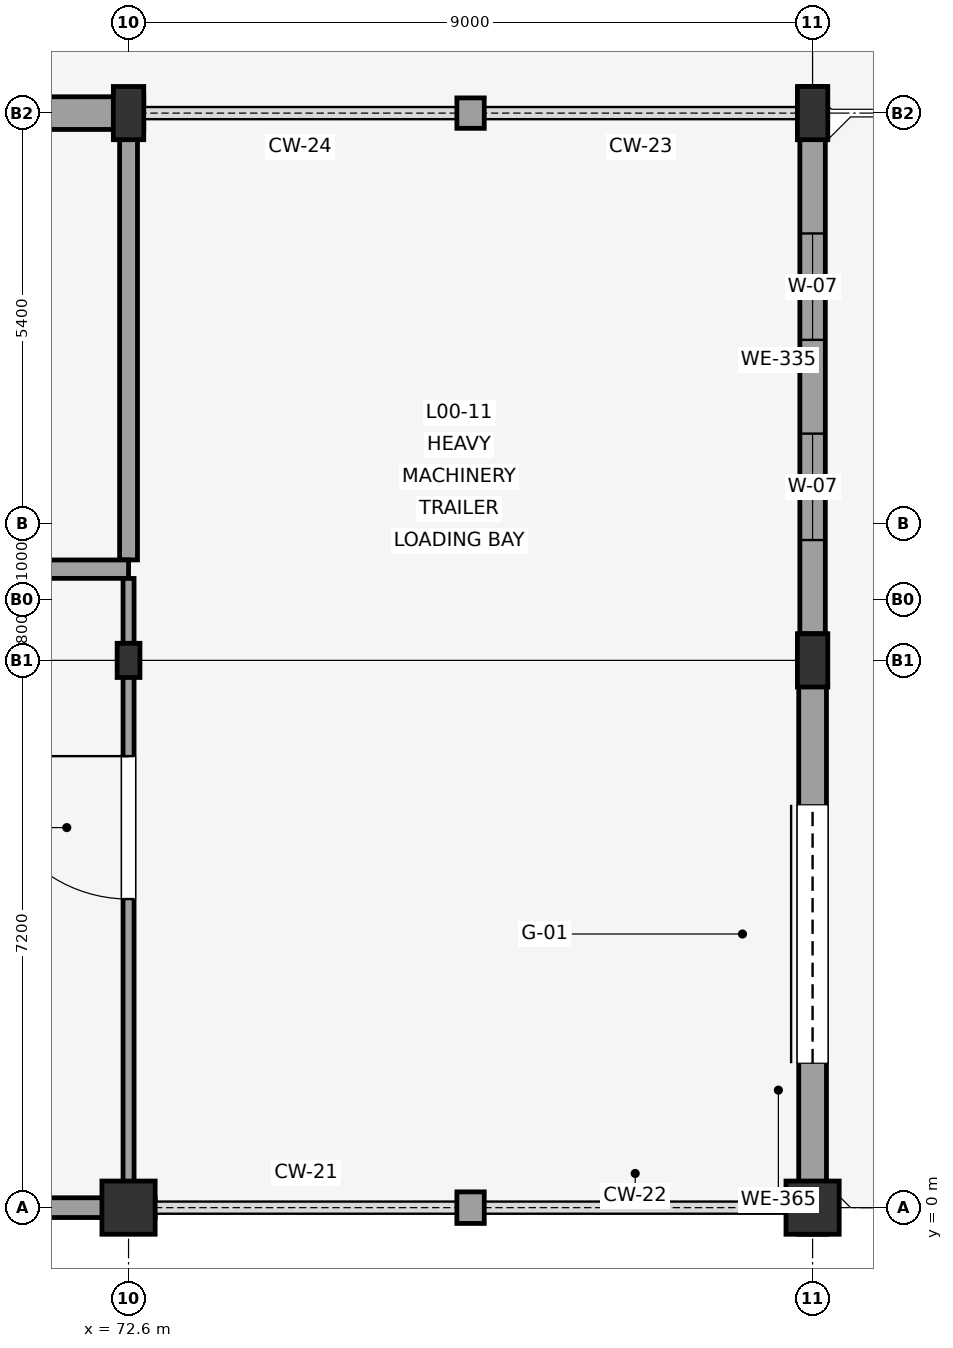
"""IFC4 building model, lengths in metres.
Left out: names, types, materials, properties, quantities, classifications, styles, units other than length and angle.
Written with IfcOpenShell. Run it as: python <this file> out.ifc"""

import sys

from ifc_helpers import new_model, si_unit, direction, frame, frame_2d, origin, origin_2d, place, context, subcontext, project, spatial, rectangle, circle, i_section, extrude, element, fill, save


model = new_model("IFC4")
c1 = context("Model", 3, precision=1e-05, world=origin(), true_north=direction((0.0, 1.0)))
c2 = subcontext(c1, "Body", "Model", "MODEL_VIEW")
j1 = project(units=[si_unit("LENGTHUNIT", "METRE"), si_unit("PLANEANGLEUNIT", "RADIAN")], contexts=[c1])
p1 = place(None, origin())
s1 = spatial("IfcSite", under=j1, at=p1, CompositionType="ELEMENT")
p2 = place(p1, origin())
s2 = spatial("IfcBuilding", under=s1, at=p2, CompositionType="ELEMENT")
p3 = place(p2, origin())
s3 = spatial("IfcBuildingStorey", under=s2, at=p3, CompositionType="ELEMENT", Elevation=0.0)
p4 = place(p3, frame((72.6, 0.0, 0.0), z_axis=(0.0, 0.0, 1.0), x_axis=(1.0, 0.0, 0.0)))
e1 = element("IfcColumn", 1, at=p4, inside=s3, PredefinedType="COLUMN", context=c2, shape_type="SweptSolid", body=[
    extrude(circle(Radius=0.35, at=origin_2d()), origin(), (0.0, 0.0, 1.0), 4.5),
])
p5 = place(p3, frame((72.6, 7.2, 0.0), z_axis=(0.0, 0.0, 1.0), x_axis=(1.0, 0.0, 0.0)))
e2 = element("IfcColumn", 2, at=p5, inside=s3, PredefinedType="COLUMN", context=c2, shape_type="SweptSolid", body=[
    extrude(i_section(OverallWidth=0.3, OverallDepth=0.45, WebThickness=0.011, FlangeThickness=0.021, FilletRadius=0.027, at=origin_2d()), origin(), (0.0, 0.0, 1.0), 4.5),
])
p6 = place(p3, frame((72.6, 14.4, 0.0), z_axis=(0.0, 0.0, 1.0), x_axis=(1.0, 0.0, 0.0)))
e3 = element("IfcColumn", 3, at=p6, inside=s3, PredefinedType="COLUMN", context=c2, shape_type="SweptSolid", body=[
    extrude(rectangle(XDim=0.4, YDim=0.7, at=origin_2d()), origin(), (0.0, 0.0, 1.0), 4.5),
])
p7 = place(p3, frame((81.6, 0.0, 0.0), z_axis=(0.0, 0.0, 1.0), x_axis=(1.0, 0.0, 0.0)))
e4 = element("IfcColumn", 4, at=p7, inside=s3, PredefinedType="COLUMN", context=c2, shape_type="SweptSolid", body=[
    extrude(circle(Radius=0.35, at=origin_2d()), origin(), (0.0, 0.0, 1.0), 4.5),
])
for number, where, z_axis, x_axis in (
    (5, (81.6, 7.2, 0.0), (0.0, 0.0, 1.0), (1.0, 0.0, 0.0)),
    (6, (81.6, 14.4, 0.0), (0.0, 0.0, 1.0), (1.0, 0.0, 0.0)),
):
    element("IfcColumn", number, at=place(p3, frame(where, z_axis=z_axis, x_axis=x_axis)), inside=s3, PredefinedType="COLUMN", context=c2, shape_type="SweptSolid", body=[
        extrude(rectangle(XDim=0.4, YDim=0.7, at=origin_2d()), origin(), (0.0, 0.0, 1.0), 4.5),
    ])
p8 = place(p3, frame((63.951, 0.0, 0.0), z_axis=(0.0, 0.0, 1.0), x_axis=(1.0, 0.0, 0.0)))
e7 = element("IfcWall", 7, at=p8, inside=s3, PredefinedType="SOLIDWALL", context=c2, shape_type="SweptSolid", body=[
    extrude(rectangle(XDim=8.999, YDim=0.26, at=frame_2d((4.5, 0.0))), origin(), (0.0, 0.0, 1.0), 3.12),
])
p9 = place(p8, frame((3.199, 0.0, 0.0)))
e8 = element("IfcOpeningElement", 8, at=p9, cuts=e7, PredefinedType="OPENING", context=c2, shape_type="SweptSolid", body=[
    extrude(rectangle(XDim=1.9, YDim=2.4, at=frame_2d((0.95, 1.2))), frame((0.0, 0.14, 0.0), z_axis=(0.0, -1.0, 0.0), x_axis=(1.0, 0.0, 0.0)), (0.0, 0.0, 1.0), 0.28),
])
p10 = place(p3, frame((72.8, 14.4, 0.0), z_axis=(0.0, 0.0, 1.0), x_axis=(-1.0, 0.0, 0.0)))
e9 = element("IfcWall", 9, at=p10, inside=s3, PredefinedType="SOLIDWALL", context=c2, shape_type="SweptSolid", body=[
    extrude(rectangle(XDim=8.999, YDim=0.43, at=frame_2d((4.5, 0.0))), origin(), (0.0, 0.0, 1.0), 3.12),
])
p11 = place(p3, frame((76.92, 0.0, 0.0), z_axis=(0.0, 0.0, 1.0), x_axis=(1.0, 0.0, 0.0)))
e10 = element("IfcWall", 10, at=p11, inside=s3, PredefinedType="SOLIDWALL", context=c2, shape_type="SweptSolid", body=[
    extrude(rectangle(XDim=0.36, YDim=0.415, at=frame_2d((0.18, 0.0))), origin(), (0.0, 0.0, 1.0), 3.12),
])
p12 = place(p3, frame((77.28, 14.4, 0.0), z_axis=(0.0, 0.0, 1.0), x_axis=(-1.0, 0.0, 0.0)))
e11 = element("IfcWall", 11, at=p12, inside=s3, PredefinedType="SOLIDWALL", context=c2, shape_type="SweptSolid", body=[
    extrude(rectangle(XDim=0.36, YDim=0.4, at=frame_2d((0.18, 0.0))), origin(), (0.0, 0.0, 1.0), 3.12),
])
p13 = place(p3, frame((81.6, -0.35, 0.0), z_axis=(0.0, 0.0, 1.0), x_axis=(0.0, 1.0, 0.0)))
e12 = element("IfcWall", 12, at=p13, inside=s3, PredefinedType="SOLIDWALL", context=c2, shape_type="SweptSolid", body=[
    extrude(rectangle(XDim=7.9, YDim=0.365, at=frame_2d((3.95, 0.0))), origin(), (0.0, 0.0, 1.0), 3.12),
])
p14 = place(p13, frame((2.25, 0.0, 0.0)))
e13 = element("IfcOpeningElement", 13, at=p14, cuts=e12, PredefinedType="OPENING", context=c2, shape_type="SweptSolid", body=[
    extrude(rectangle(XDim=3.4, YDim=2.85, at=frame_2d((1.7, 1.425))), frame((0.0, 0.192, 0.0), z_axis=(0.0, -1.0, 0.0), x_axis=(1.0, 0.0, 0.0)), (0.0, 0.0, 1.0), 0.385),
])
p15 = place(p3, frame((81.6, 7.551, 0.0), z_axis=(0.0, 0.0, 1.0), x_axis=(0.0, 1.0, 0.0)))
e14 = element("IfcWall", 14, at=p15, inside=s3, PredefinedType="SOLIDWALL", context=c2, shape_type="SweptSolid", body=[
    extrude(rectangle(XDim=7.199, YDim=0.335, at=frame_2d((3.6, 0.0))), origin(), (0.0, 0.0, 1.0), 3.12),
])
p16 = place(p15, frame((1.232, 0.0, 0.7)))
e15 = element("IfcOpeningElement", 15, at=p16, cuts=e14, PredefinedType="OPENING", context=c2, shape_type="SweptSolid", body=[
    extrude(rectangle(XDim=1.4, YDim=2.2, at=frame_2d((0.7, 1.1))), frame((0.0, 0.177, 0.0), z_axis=(0.0, -1.0, 0.0), x_axis=(1.0, 0.0, 0.0)), (0.0, 0.0, 1.0), 0.355),
])
p17 = place(p15, frame((3.866, 0.0, 0.7)))
e16 = element("IfcOpeningElement", 16, at=p17, cuts=e14, PredefinedType="OPENING", context=c2, shape_type="SweptSolid", body=[
    extrude(rectangle(XDim=1.4, YDim=2.2, at=frame_2d((0.7, 1.1))), frame((0.0, 0.177, 0.0), z_axis=(0.0, -1.0, 0.0), x_axis=(1.0, 0.0, 0.0)), (0.0, 0.0, 1.0), 0.355),
])
p18 = place(p3, frame((72.6, 14.184, 0.0), z_axis=(0.0, 0.0, 1.0), x_axis=(0.0, -1.0, 0.0)))
e17 = element("IfcWall", 17, at=p18, inside=s3, PredefinedType="PARTITIONING", context=c2, shape_type="SweptSolid", body=[
    extrude(rectangle(XDim=5.662, YDim=0.235, at=frame_2d((2.831, 0.0))), origin(), (0.0, 0.0, 1.0), 2.7),
])
p19 = place(p3, frame((72.6, 8.4, 0.0), z_axis=(0.0, 0.0, 1.0), x_axis=(-1.0, 0.0, 0.0)))
e18 = element("IfcWall", 18, at=p19, inside=s3, PredefinedType="SOLIDWALL", context=c2, shape_type="SweptSolid", body=[
    extrude(rectangle(XDim=18.0, YDim=0.242, at=frame_2d((9.0, 0.0))), origin(), (0.0, 0.0, 1.0), 2.7),
])
p20 = place(p19, frame((12.62, 0.0, 0.0)))
e19 = element("IfcOpeningElement", 19, at=p20, cuts=e18, PredefinedType="OPENING", context=c2, shape_type="SweptSolid", body=[
    extrude(rectangle(XDim=1.76, YDim=2.22, at=frame_2d((0.88, 1.11))), frame((0.0, 0.131, 0.0), z_axis=(0.0, -1.0, 0.0), x_axis=(1.0, 0.0, 0.0)), (0.0, 0.0, 1.0), 0.262),
])
p21 = place(p3, frame((72.6, 0.131, 0.0), z_axis=(0.0, 0.0, 1.0), x_axis=(0.0, 1.0, 0.0)))
e20 = element("IfcWall", 20, at=p21, inside=s3, PredefinedType="PARTITIONING", context=c2, shape_type="SweptSolid", body=[
    extrude(rectangle(XDim=8.147, YDim=0.145, at=frame_2d((4.073, 0.0))), origin(), (0.0, 0.0, 1.0), 2.7),
])
p22 = place(p21, frame((3.929, 0.0, 0.0)))
e21 = element("IfcOpeningElement", 21, at=p22, cuts=e20, PredefinedType="OPENING", context=c2, shape_type="SweptSolid", body=[
    extrude(rectangle(XDim=1.88, YDim=2.25, at=frame_2d((0.94, 1.125))), frame((0.0, 0.083, 0.0), z_axis=(0.0, -1.0, 0.0), x_axis=(1.0, 0.0, 0.0)), (0.0, 0.0, 1.0), 0.165),
])
p23 = place(p14, origin())
e22 = element("IfcDoor", 22, at=p23, inside=s3, OperationType="ROLLINGUP", PredefinedType="GATE", context=c2, shape_type="SweptSolid", body=[
    extrude(rectangle(XDim=3.4, YDim=2.85, at=frame_2d((1.7, 1.425))), frame((0.0, 0.025, 0.0), z_axis=(0.0, -1.0, 0.0), x_axis=(1.0, 0.0, 0.0)), (0.0, 0.0, 1.0), 0.05),
])
fill(e13, e22)
p24 = place(p16, origin())
e23 = element("IfcWindow", 23, at=p24, inside=s3, PartitioningType="SINGLE_PANEL", PredefinedType="WINDOW", context=c2, shape_type="SweptSolid", body=[
    extrude(rectangle(XDim=1.4, YDim=2.2, at=frame_2d((0.7, 1.1))), frame((0.0, 0.03, 0.0), z_axis=(0.0, -1.0, 0.0), x_axis=(1.0, 0.0, 0.0)), (0.0, 0.0, 1.0), 0.06),
])
fill(e15, e23)
p25 = place(p17, origin())
e24 = element("IfcWindow", 24, at=p25, inside=s3, PartitioningType="SINGLE_PANEL", PredefinedType="WINDOW", context=c2, shape_type="SweptSolid", body=[
    extrude(rectangle(XDim=1.4, YDim=2.2, at=frame_2d((0.7, 1.1))), frame((0.0, 0.03, 0.0), z_axis=(0.0, -1.0, 0.0), x_axis=(1.0, 0.0, 0.0)), (0.0, 0.0, 1.0), 0.06),
])
fill(e16, e24)
p26 = place(p22, origin())
e25 = element("IfcDoor", 25, at=p26, inside=s3, OperationType="SINGLE_SWING_RIGHT", PredefinedType="DOOR", context=c2, shape_type="SweptSolid", body=[
    extrude(rectangle(XDim=1.88, YDim=2.25, at=frame_2d((0.94, 1.125))), frame((0.0, 0.025, 0.0), z_axis=(0.0, -1.0, 0.0), x_axis=(1.0, 0.0, 0.0)), (0.0, 0.0, 1.0), 0.05),
])
fill(e21, e25)
save(model, sys.argv[1])
